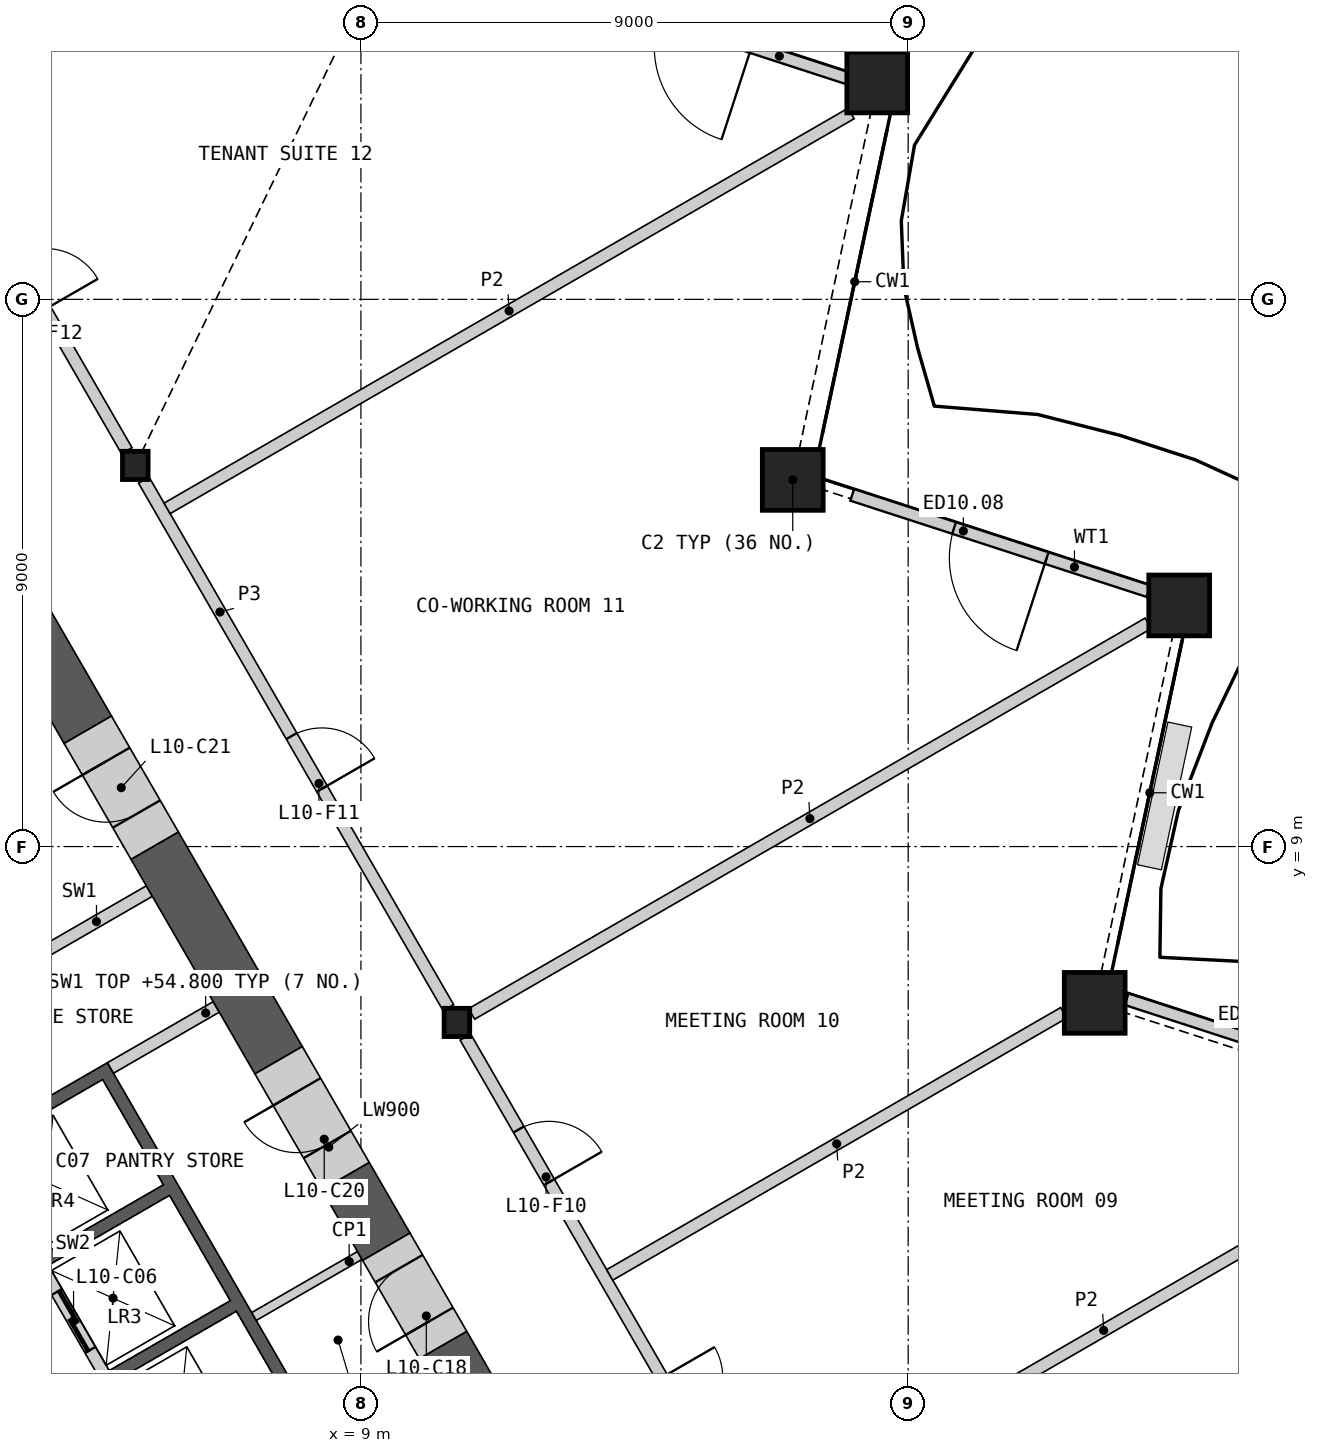
"""IFC4 building model, lengths in metres.
Left out: names, types, materials, properties, quantities, classifications, styles, units other than length and angle.
Written with IfcOpenShell. Run it as: python <this file> out.ifc"""

import sys

from ifc_helpers import new_model, si_unit, direction, frame, frame_2d, origin, origin_2d, place, context, subcontext, project, spatial, polyline, rectangle, hollow_rectangle, i_section, outline, extrude, element, fill, save


model = new_model("IFC4")
c1 = context("Model", 3, precision=1e-05, world=origin(), true_north=direction((0.0, 1.0)))
c2 = subcontext(c1, "Body", "Model", "MODEL_VIEW")
j1 = project(units=[si_unit("LENGTHUNIT", "METRE"), si_unit("PLANEANGLEUNIT", "RADIAN")], contexts=[c1])
p1 = place(None, origin())
s1 = spatial("IfcSite", under=j1, at=p1, CompositionType="ELEMENT")
p2 = place(p1, origin())
s2 = spatial("IfcBuilding", under=s1, at=p2, CompositionType="ELEMENT")
p3 = place(p2, frame((0.0, 0.0, 51.0)))
s3 = spatial("IfcBuildingStorey", under=s2, at=p3, CompositionType="ELEMENT", Elevation=51.0)
for number, where, z_axis, x_axis in (
    (1, (21.068, 6.429, 0.0), (0.0, 0.0, 1.0), (1.0, 0.0, 0.0)),
    (2, (22.457, 12.966, 0.0), (0.0, 0.0, 1.0), (1.0, 0.0, 0.0)),
    (3, (16.102, 15.031, 0.0), (0.0, 0.0, 1.0), (1.0, 0.0, 0.0)),
    (4, (17.491, 21.567, 0.0), (0.0, 0.0, 1.0), (1.0, 0.0, 0.0)),
):
    element("IfcColumn", number, at=place(p3, frame(where, z_axis=z_axis, x_axis=x_axis)), inside=s3, PredefinedType="COLUMN", context=c2, shape_type="SweptSolid", body=[
        extrude(hollow_rectangle(XDim=1.0, YDim=1.0, WallThickness=0.07, at=origin_2d()), origin(), (0.0, 0.0, 1.0), 4.2),
    ])
for number, where, z_axis, x_axis in (
    (5, (10.578, 6.107, 0.0), (0.0, 0.0, 1.0), (1.0, 0.0, 0.0)),
    (6, (5.289, 15.269, 0.0), (0.0, 0.0, 1.0), (1.0, 0.0, 0.0)),
):
    element("IfcColumn", number, at=place(p3, frame(where, z_axis=z_axis, x_axis=x_axis)), inside=s3, PredefinedType="COLUMN", context=c2, shape_type="SweptSolid", body=[
        extrude(i_section(OverallWidth=0.421, OverallDepth=0.465, WebThickness=0.045, FlangeThickness=0.072, at=origin_2d()), origin(), (0.0, 0.0, 1.0), 4.2),
    ])
p4 = place(p3, frame((26.899, 4.765, 0.0), z_axis=(0.0, 0.0, 1.0), x_axis=(-0.951054004345, 0.309024725255, 0.0)))
e7 = element("IfcWall", 7, at=p4, inside=s3, PredefinedType="SOLIDWALL", context=c2, shape_type="SweptSolid", body=[
    extrude(rectangle(XDim=5.579, YDim=0.2, at=frame_2d((2.79, 0.0))), origin(), (0.0, 0.0, 1.0), 3.189),
])
p5 = place(p4, frame((1.86, 0.0, 0.0)))
e8 = element("IfcOpeningElement", 8, at=p5, cuts=e7, PredefinedType="OPENING", context=c2, shape_type="SweptSolid", body=[
    extrude(rectangle(XDim=1.6, YDim=2.4, at=frame_2d((0.8, 1.2))), frame((0.0, 0.11, 0.0), z_axis=(0.0, -1.0, 0.0), x_axis=(1.0, 0.0, 0.0)), (0.0, 0.0, 1.0), 0.22),
])
p6 = place(p3, frame((21.953, 13.2, 0.0), z_axis=(0.0, 0.0, 1.0), x_axis=(-0.951052624268, 0.309028972547, 0.0)))
e9 = element("IfcWall", 9, at=p6, inside=s3, PredefinedType="SOLIDWALL", context=c2, shape_type="SweptSolid", body=[
    extrude(rectangle(XDim=5.124, YDim=0.2, at=frame_2d((2.562, 0.0))), origin(), (0.0, 0.0, 1.0), 3.189),
])
p7 = place(p6, frame((1.762, 0.0, 0.0)))
e10 = element("IfcOpeningElement", 10, at=p7, cuts=e9, PredefinedType="OPENING", context=c2, shape_type="SweptSolid", body=[
    extrude(rectangle(XDim=1.6, YDim=2.4, at=frame_2d((0.8, 1.2))), frame((0.0, 0.11, 0.0), z_axis=(0.0, -1.0, 0.0), x_axis=(1.0, 0.0, 0.0)), (0.0, 0.0, 1.0), 0.22),
])
p8 = place(p3, frame((17.1, 21.605, 0.0), z_axis=(0.0, 0.0, 1.0), x_axis=(-0.951048073862, 0.309042976306, 0.0)))
e11 = element("IfcWall", 11, at=p8, inside=s3, PredefinedType="SOLIDWALL", context=c2, shape_type="SweptSolid", body=[
    extrude(rectangle(XDim=5.124, YDim=0.2, at=frame_2d((2.562, 0.0))), origin(), (0.0, 0.0, 1.0), 3.189),
])
p9 = place(p8, frame((1.762, 0.0, 0.0)))
e12 = element("IfcOpeningElement", 12, at=p9, cuts=e11, PredefinedType="OPENING", context=c2, shape_type="SweptSolid", body=[
    extrude(rectangle(XDim=1.6, YDim=2.4, at=frame_2d((0.8, 1.2))), frame((0.0, 0.11, 0.0), z_axis=(0.0, -1.0, 0.0), x_axis=(1.0, 0.0, 0.0)), (0.0, 0.0, 1.0), 0.22),
])
p10 = place(p3, origin())
e13 = element("IfcWall", 13, at=p10, inside=s3, PredefinedType="SHEAR", context=c2, shape_type="SweptSolid", body=[
    extrude(outline(polyline([(2.66, 4.192), (4.831, 5.445), (8.231, -0.444), (6.061, -1.697), (5.96, -1.524), (7.952, -0.374), (6.952, 1.358), (4.96, 0.208), (4.861, 0.381), (6.852, 1.531), (5.852, 3.263), (3.861, 2.113), (3.76, 2.287), (5.752, 3.437), (4.752, 5.169), (2.76, 4.019), (2.66, 4.192)])), origin(), (0.0, 0.0, 1.0), 3.8),
])
p11 = place(p3, frame((5.817, -1.476, 0.0), z_axis=(0.0, 0.0, 1.0), x_axis=(-0.500002616675, 0.866023893041, 0.0)))
e14 = element("IfcWall", 14, at=p11, inside=s3, PredefinedType="SOLIDWALL", context=c2, shape_type="SweptSolid", body=[
    extrude(rectangle(XDim=8.373, YDim=0.2, at=frame_2d((4.187, 0.0))), origin(), (0.0, 0.0, 1.0), 3.8),
])
p12 = place(p11, frame((0.337, 0.0, 0.0)))
e15 = element("IfcOpeningElement", 15, at=p12, cuts=e14, PredefinedType="OPENING", context=c2, shape_type="SweptSolid", body=[
    extrude(rectangle(XDim=1.1, YDim=2.1, at=frame_2d((0.55, 1.05))), frame((0.0, 0.11, 0.0), z_axis=(0.0, -1.0, 0.0), x_axis=(1.0, 0.0, 0.0)), (0.0, 0.0, 1.0), 0.22),
])
p13 = place(p11, frame((2.537, 0.0, 0.0)))
e16 = element("IfcOpeningElement", 16, at=p13, cuts=e14, PredefinedType="OPENING", context=c2, shape_type="SweptSolid", body=[
    extrude(rectangle(XDim=1.1, YDim=2.1, at=frame_2d((0.55, 1.05))), frame((0.0, 0.11, 0.0), z_axis=(0.0, -1.0, 0.0), x_axis=(1.0, 0.0, 0.0)), (0.0, 0.0, 1.0), 0.22),
])
p14 = place(p11, frame((4.737, 0.0, 0.0)))
e17 = element("IfcOpeningElement", 17, at=p14, cuts=e14, PredefinedType="OPENING", context=c2, shape_type="SweptSolid", body=[
    extrude(rectangle(XDim=1.1, YDim=2.1, at=frame_2d((0.55, 1.05))), frame((0.0, 0.11, 0.0), z_axis=(0.0, -1.0, 0.0), x_axis=(1.0, 0.0, 0.0)), (0.0, 0.0, 1.0), 0.22),
])
p15 = place(p11, frame((7.037, 0.0, 0.0)))
e18 = element("IfcOpeningElement", 18, at=p15, cuts=e14, PredefinedType="OPENING", context=c2, shape_type="SweptSolid", body=[
    extrude(rectangle(XDim=0.9, YDim=2.1, at=frame_2d((0.45, 1.05))), frame((0.0, 0.11, 0.0), z_axis=(0.0, -1.0, 0.0), x_axis=(1.0, 0.0, 0.0)), (0.0, 0.0, 1.0), 0.22),
])
p16 = place(p3, frame((4.881, 5.358, 0.0), z_axis=(0.0, 0.0, 1.0), x_axis=(0.866035824272, 0.499981950752, 0.0)))
e19 = element("IfcWall", 19, at=p16, inside=s3, PredefinedType="SHEAR", context=c2, shape_type="SweptSolid", body=[
    extrude(rectangle(XDim=2.009, YDim=0.2, at=frame_2d((1.004, 0.0))), origin(), (0.0, 0.0, 1.0), 3.8),
])
p17 = place(p3, frame((3.781, 7.263, 0.0), z_axis=(0.0, 0.0, 1.0), x_axis=(0.865983199114, 0.50007309351, 0.0)))
e20 = element("IfcWall", 20, at=p17, inside=s3, PredefinedType="SHEAR", context=c2, shape_type="SweptSolid", body=[
    extrude(rectangle(XDim=2.009, YDim=0.2, at=frame_2d((1.004, 0.0))), origin(), (0.0, 0.0, 1.0), 3.8),
])
p18 = place(p3, frame((8.268, -0.509, 0.0), z_axis=(0.0, 0.0, 1.0), x_axis=(0.866035824272, 0.499981950752, 0.0)))
e21 = element("IfcWall", 21, at=p18, inside=s3, PredefinedType="PARTITIONING", context=c2, shape_type="SweptSolid", body=[
    extrude(rectangle(XDim=2.009, YDim=0.15, at=frame_2d((1.004, 0.0))), origin(), (0.0, 0.0, 1.0), 3.8),
])
p19 = place(p3, frame((8.981, 2.275, 0.0), z_axis=(0.0, 0.0, 1.0), x_axis=(-0.866013584312, -0.500020471368, 0.0)))
e22 = element("IfcWall", 22, at=p19, inside=s3, PredefinedType="PARTITIONING", context=c2, shape_type="SweptSolid", body=[
    extrude(rectangle(XDim=2.009, YDim=0.15, at=frame_2d((1.005, 0.0))), origin(), (0.0, 0.0, 1.0), 3.8),
])
p20 = place(p3, frame((7.646, 5.486, 0.0), z_axis=(0.0, 0.0, 1.0), x_axis=(-0.499978218965, 0.866037978706, 0.0)))
e23 = element("IfcWall", 23, at=p20, inside=s3, PredefinedType="SHEAR", context=c2, shape_type="SweptSolid", body=[
    extrude(rectangle(XDim=4.076, YDim=0.9, at=frame_2d((2.038, 0.0))), origin(), (0.0, 0.0, 1.0), 3.8),
])
p21 = place(p3, frame((4.509, 10.921, 0.0), z_axis=(0.0, 0.0, 1.0), x_axis=(-0.49999004381, 0.866031151917, 0.0)))
e24 = element("IfcWall", 24, at=p21, inside=s3, PredefinedType="SHEAR", context=c2, shape_type="SweptSolid", body=[
    extrude(rectangle(XDim=3.975, YDim=0.9, at=frame_2d((1.988, 0.0))), origin(), (0.0, 0.0, 1.0), 3.8),
])
p22 = place(p3, frame((11.755, -1.63, 0.0), z_axis=(0.0, 0.0, 1.0), x_axis=(-0.499943114462, 0.866058244174, 0.0)))
e25 = element("IfcWall", 25, at=p22, inside=s3, PredefinedType="SHEAR", context=c2, shape_type="SweptSolid", body=[
    extrude(rectangle(XDim=2.809, YDim=0.9, at=frame_2d((1.405, 0.0))), origin(), (0.0, 0.0, 1.0), 3.8),
])
p23 = place(p3, frame((9.418, 2.418, 0.0), z_axis=(0.0, 0.0, 1.0), x_axis=(-0.49995335277, 0.8660523339, 0.0)))
e26 = element("IfcWall", 26, at=p23, inside=s3, PredefinedType="SHEAR", context=c2, shape_type="SweptSolid", body=[
    extrude(rectangle(XDim=1.343, YDim=0.9, at=frame_2d((0.671, 0.0))), origin(), (0.0, 0.0, 1.0), 3.8),
])
p24 = place(p3, frame((10.35, 0.803, 0.0), z_axis=(0.0, 0.0, 1.0), x_axis=(-0.500081290722, 0.865978465477, 0.0)))
e27 = element("IfcWall", 27, at=p24, inside=s3, PredefinedType="SHEAR", context=c2, shape_type="SweptSolid", body=[
    extrude(rectangle(XDim=1.865, YDim=0.9, at=frame_2d((0.933, 0.0))), origin(), (0.0, 0.0, 1.0), 3.8),
])
p25 = place(p24, frame((0.45, 0.0, 0.0)))
e28 = element("IfcOpeningElement", 28, at=p25, cuts=e27, PredefinedType="OPENING", context=c2, shape_type="SweptSolid", body=[
    extrude(rectangle(XDim=1.0, YDim=2.1, at=frame_2d((0.5, 1.05))), frame((0.0, 0.46, 0.0), z_axis=(0.0, -1.0, 0.0), x_axis=(1.0, 0.0, 0.0)), (0.0, 0.0, 1.0), 0.92),
])
p26 = place(p3, frame((8.747, 3.58, 0.0), z_axis=(0.0, 0.0, 1.0), x_axis=(-0.50002983664, 0.866008176907, 0.0)))
e29 = element("IfcWall", 29, at=p26, inside=s3, PredefinedType="SHEAR", context=c2, shape_type="SweptSolid", body=[
    extrude(rectangle(XDim=2.2, YDim=0.9, at=frame_2d((1.1, 0.0))), origin(), (0.0, 0.0, 1.0), 3.8),
])
p27 = place(p26, frame((0.6, 0.0, 0.0)))
e30 = element("IfcOpeningElement", 30, at=p27, cuts=e29, PredefinedType="OPENING", context=c2, shape_type="SweptSolid", body=[
    extrude(rectangle(XDim=1.0, YDim=2.1, at=frame_2d((0.5, 1.05))), frame((0.0, 0.46, 0.0), z_axis=(0.0, -1.0, 0.0), x_axis=(1.0, 0.0, 0.0)), (0.0, 0.0, 1.0), 0.92),
])
p28 = place(p3, frame((5.608, 9.016, 0.0), z_axis=(0.0, 0.0, 1.0), x_axis=(-0.499994660107, 0.866028486751, 0.0)))
e31 = element("IfcWall", 31, at=p28, inside=s3, PredefinedType="SHEAR", context=c2, shape_type="SweptSolid", body=[
    extrude(rectangle(XDim=2.2, YDim=0.9, at=frame_2d((1.1, 0.0))), origin(), (0.0, 0.0, 1.0), 3.8),
])
p29 = place(p28, frame((0.6, 0.0, 0.0)))
e32 = element("IfcOpeningElement", 32, at=p29, cuts=e31, PredefinedType="OPENING", context=c2, shape_type="SweptSolid", body=[
    extrude(rectangle(XDim=1.0, YDim=2.1, at=frame_2d((0.5, 1.05))), frame((0.0, 0.46, 0.0), z_axis=(0.0, -1.0, 0.0), x_axis=(1.0, 0.0, 0.0)), (0.0, 0.0, 1.0), 0.92),
])
p30 = place(p3, frame((10.719, 5.865, 0.0), z_axis=(0.0, 0.0, 1.0), x_axis=(0.49999175339, -0.866030164915, 0.0)))
e33 = element("IfcWall", 33, at=p30, inside=s3, PredefinedType="PARTITIONING", context=c2, shape_type="SweptSolid", body=[
    extrude(rectangle(XDim=10.019, YDim=0.2, at=frame_2d((5.009, 0.0))), origin(), (0.0, 0.0, 1.0), 3.8),
])
p31 = place(p30, frame((6.464, 0.0, 0.0)))
e34 = element("IfcOpeningElement", 34, at=p31, cuts=e33, PredefinedType="OPENING", context=c2, shape_type="SweptSolid", body=[
    extrude(rectangle(XDim=1.0, YDim=2.1, at=frame_2d((0.5, 1.05))), frame((0.0, 0.11, 0.0), z_axis=(0.0, -1.0, 0.0), x_axis=(1.0, 0.0, 0.0)), (0.0, 0.0, 1.0), 0.22),
])
p32 = place(p30, frame((1.753, 0.0, 0.0)))
e35 = element("IfcOpeningElement", 35, at=p32, cuts=e33, PredefinedType="OPENING", context=c2, shape_type="SweptSolid", body=[
    extrude(rectangle(XDim=1.0, YDim=2.1, at=frame_2d((0.5, 1.05))), frame((0.0, 0.11, 0.0), z_axis=(0.0, -1.0, 0.0), x_axis=(1.0, 0.0, 0.0)), (0.0, 0.0, 1.0), 0.22),
])
p33 = place(p3, frame((5.429, 15.026, 0.0), z_axis=(0.0, 0.0, 1.0), x_axis=(0.50001002959, -0.86601961312, 0.0)))
e36 = element("IfcWall", 36, at=p33, inside=s3, PredefinedType="PARTITIONING", context=c2, shape_type="SweptSolid", body=[
    extrude(rectangle(XDim=10.019, YDim=0.2, at=frame_2d((5.009, 0.0))), origin(), (0.0, 0.0, 1.0), 3.8),
])
p34 = place(p33, frame((4.86, 0.0, 0.0)))
e37 = element("IfcOpeningElement", 37, at=p34, cuts=e36, PredefinedType="OPENING", context=c2, shape_type="SweptSolid", body=[
    extrude(rectangle(XDim=1.0, YDim=2.1, at=frame_2d((0.5, 1.05))), frame((0.0, 0.11, 0.0), z_axis=(0.0, -1.0, 0.0), x_axis=(1.0, 0.0, 0.0)), (0.0, 0.0, 1.0), 0.22),
])
p35 = place(p3, frame((1.913, 21.116, 0.0), z_axis=(0.0, 0.0, 1.0), x_axis=(0.500001069878, -0.866024786089, 0.0)))
e38 = element("IfcWall", 38, at=p35, inside=s3, PredefinedType="PARTITIONING", context=c2, shape_type="SweptSolid", body=[
    extrude(rectangle(XDim=6.473, YDim=0.2, at=frame_2d((3.236, 0.0))), origin(), (0.0, 0.0, 1.0), 3.8),
])
p36 = place(p35, frame((2.787, 0.0, 0.0)))
e39 = element("IfcOpeningElement", 39, at=p36, cuts=e38, PredefinedType="OPENING", context=c2, shape_type="SweptSolid", body=[
    extrude(rectangle(XDim=1.0, YDim=2.1, at=frame_2d((0.5, 1.05))), frame((0.0, 0.11, 0.0), z_axis=(0.0, -1.0, 0.0), x_axis=(1.0, 0.0, 0.0)), (0.0, 0.0, 1.0), 0.22),
])
p37 = place(p3, frame((2.041, 21.093, 0.0), z_axis=(0.0, 0.0, 1.0), x_axis=(0.778730857737, 0.627358152261, 0.0)))
e40 = element("IfcWall", 40, at=p37, inside=s3, PredefinedType="PARTITIONING", context=c2, shape_type="SweptSolid", body=[
    extrude(rectangle(XDim=13.654, YDim=0.2, at=frame_2d((6.827, 0.0))), origin(), (0.0, 0.0, 1.0), 2.885),
])
p38 = place(p3, frame((15.518, -2.248, 0.0), z_axis=(0.0, 0.0, 1.0), x_axis=(0.866025231175, 0.500000298968, 0.0)))
e41 = element("IfcWall", 41, at=p38, inside=s3, PredefinedType="PARTITIONING", context=c2, shape_type="SweptSolid", body=[
    extrude(rectangle(XDim=13.159, YDim=0.2, at=frame_2d((6.579, 0.0))), origin(), (0.0, 0.0, 1.0), 2.885),
])
p39 = place(p3, frame((5.812, 14.562, 0.0), z_axis=(0.0, 0.0, 1.0), x_axis=(0.866020631549, 0.500008265664, 0.0)))
e42 = element("IfcWall", 42, at=p39, inside=s3, PredefinedType="PARTITIONING", context=c2, shape_type="SweptSolid", body=[
    extrude(rectangle(XDim=12.989, YDim=0.2, at=frame_2d((6.495, 0.0))), origin(), (0.0, 0.0, 1.0), 2.885),
])
p40 = place(p3, frame((10.821, 6.247, 0.0), z_axis=(0.0, 0.0, 1.0), x_axis=(0.866026729935, 0.499997703033, 0.0)))
e43 = element("IfcWall", 43, at=p40, inside=s3, PredefinedType="PARTITIONING", context=c2, shape_type="SweptSolid", body=[
    extrude(rectangle(XDim=12.848, YDim=0.2, at=frame_2d((6.424, 0.0))), origin(), (0.0, 0.0, 1.0), 2.885),
])
p41 = place(p3, frame((13.091, 1.955, 0.0), z_axis=(0.0, 0.0, 1.0), x_axis=(0.866026670206, 0.499997806488, 0.0)))
e44 = element("IfcWall", 44, at=p41, inside=s3, PredefinedType="PARTITIONING", context=c2, shape_type="SweptSolid", body=[
    extrude(rectangle(XDim=8.622, YDim=0.2, at=frame_2d((4.311, 0.0))), origin(), (0.0, 0.0, 1.0), 2.885),
])
p42 = place(p7, origin())
e45 = element("IfcDoor", 45, at=p42, inside=s3, OperationType="DOUBLE_DOOR_SINGLE_SWING", PredefinedType="DOOR", context=c2, shape_type="SweptSolid", body=[
    extrude(rectangle(XDim=1.6, YDim=2.4, at=frame_2d((0.8, 1.2))), frame((0.0, 0.025, 0.0), z_axis=(0.0, -1.0, 0.0), x_axis=(1.0, 0.0, 0.0)), (0.0, 0.0, 1.0), 0.05),
])
fill(e10, e45)
p43 = place(p13, origin())
e46 = element("IfcDoor", 46, at=p43, inside=s3, OperationType="SLIDING_TO_LEFT", PredefinedType="DOOR", context=c2, shape_type="SweptSolid", body=[
    extrude(rectangle(XDim=1.1, YDim=2.1, at=frame_2d((0.55, 1.05))), frame((0.0, 0.025, 0.0), z_axis=(0.0, -1.0, 0.0), x_axis=(1.0, 0.0, 0.0)), (0.0, 0.0, 1.0), 0.05),
])
fill(e16, e46)
p44 = place(p25, origin())
e47 = element("IfcDoor", 47, at=p44, inside=s3, OperationType="SINGLE_SWING_LEFT", PredefinedType="DOOR", context=c2, shape_type="SweptSolid", body=[
    extrude(rectangle(XDim=1.0, YDim=2.1, at=frame_2d((0.5, 1.05))), frame((0.0, 0.205, 0.0), z_axis=(0.0, -1.0, 0.0), x_axis=(1.0, 0.0, 0.0)), (0.0, 0.0, 1.0), 0.05),
])
fill(e28, e47)
p45 = place(p27, origin())
e48 = element("IfcDoor", 48, at=p45, inside=s3, OperationType="SINGLE_SWING_RIGHT", PredefinedType="DOOR", context=c2, shape_type="SweptSolid", body=[
    extrude(rectangle(XDim=1.0, YDim=2.1, at=frame_2d((0.5, 1.05))), frame((0.0, 0.205, 0.0), z_axis=(0.0, -1.0, 0.0), x_axis=(1.0, 0.0, 0.0)), (0.0, 0.0, 1.0), 0.05),
])
fill(e30, e48)
p46 = place(p29, origin())
e49 = element("IfcDoor", 49, at=p46, inside=s3, OperationType="SINGLE_SWING_RIGHT", PredefinedType="DOOR", context=c2, shape_type="SweptSolid", body=[
    extrude(rectangle(XDim=1.0, YDim=2.1, at=frame_2d((0.5, 1.05))), frame((0.0, 0.205, 0.0), z_axis=(0.0, -1.0, 0.0), x_axis=(1.0, 0.0, 0.0)), (0.0, 0.0, 1.0), 0.05),
])
fill(e32, e49)
p47 = place(p32, origin())
e50 = element("IfcDoor", 50, at=p47, inside=s3, OperationType="SINGLE_SWING_RIGHT", PredefinedType="DOOR", context=c2, shape_type="SweptSolid", body=[
    extrude(rectangle(XDim=1.0, YDim=2.1, at=frame_2d((0.5, 1.05))), frame((0.0, 0.025, 0.0), z_axis=(0.0, -1.0, 0.0), x_axis=(1.0, 0.0, 0.0)), (0.0, 0.0, 1.0), 0.05),
])
fill(e35, e50)
p48 = place(p34, origin())
e51 = element("IfcDoor", 51, at=p48, inside=s3, OperationType="SINGLE_SWING_RIGHT", PredefinedType="DOOR", context=c2, shape_type="SweptSolid", body=[
    extrude(rectangle(XDim=1.0, YDim=2.1, at=frame_2d((0.5, 1.05))), frame((0.0, 0.025, 0.0), z_axis=(0.0, -1.0, 0.0), x_axis=(1.0, 0.0, 0.0)), (0.0, 0.0, 1.0), 0.05),
])
fill(e37, e51)
save(model, sys.argv[1])
